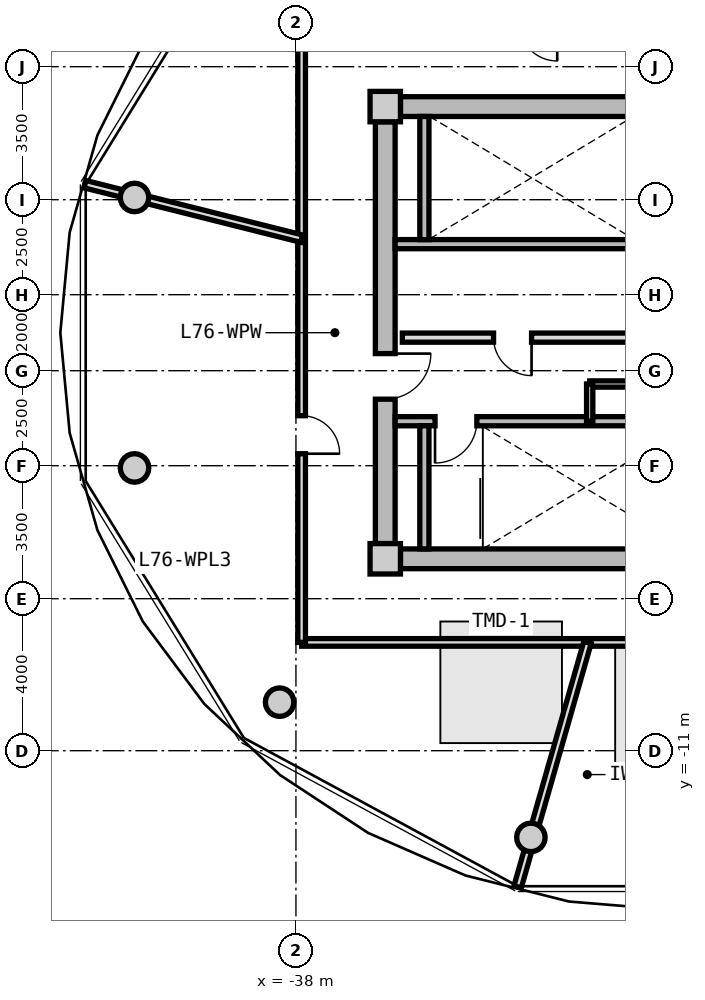
"""IFC4 building model, lengths in metres.
Left out: names, types, materials, properties, quantities, classifications, styles, units other than length and angle.
Written with IfcOpenShell. Run it as: python <this file> out.ifc"""

import sys

from ifc_helpers import new_model, si_unit, direction, frame, frame_2d, origin, origin_2d, place, context, subcontext, project, spatial, rectangle, circle, extrude, source, transform, mapped, element, fill, save


model = new_model("IFC4")
c1 = context("Model", 3, precision=1e-05, world=origin(), true_north=direction((0.0, 1.0)))
c2 = subcontext(c1, "Body", "Model", "MODEL_VIEW")
j1 = project(units=[si_unit("LENGTHUNIT", "METRE"), si_unit("PLANEANGLEUNIT", "RADIAN")], contexts=[c1])
p1 = place(None, origin())
s1 = spatial("IfcSite", under=j1, at=p1, CompositionType="ELEMENT")
p2 = place(p1, origin())
s2 = spatial("IfcBuilding", under=s1, at=p2, CompositionType="ELEMENT")
p3 = place(p2, frame((0.0, 0.0, 244.4)))
s3 = spatial("IfcBuildingStorey", under=s2, at=p3, CompositionType="ELEMENT", Elevation=244.4)
m1 = source(origin(), c2, "Body", "SweptSolid", [
    extrude(rectangle(XDim=0.8, YDim=0.8, at=origin_2d()), origin(), (0.0, 0.0, 1.0), 5.45),
])
for number, where, z_axis, x_axis in (
    (1, (-35.65, -5.95, 0.0), (0.0, 0.0, 1.0), (1.0, 0.0, 0.0)),
    (2, (-35.65, 5.95, 0.0), (0.0, 0.0, 1.0), (1.0, 0.0, 0.0)),
):
    element("IfcColumn", number, at=place(p3, frame(where, z_axis=z_axis, x_axis=x_axis)), inside=s3, PredefinedType="COLUMN", context=c2, shape_type="MappedRepresentation", body=[
        mapped(m1, transform((0.0, 0.0, 0.0), x_axis=(1.0, 0.0, 0.0), y_axis=(0.0, 1.0, 0.0), z_axis=(0.0, 0.0, 1.0), scale=1.0)),
    ])
m2 = source(origin(), c2, "Body", "SweptSolid", [
    extrude(rectangle(XDim=14.5, YDim=0.52, at=frame_2d((7.25, 0.0))), origin(), (0.0, 0.0, 1.0), 5.175),
])
for number, where, z_axis, x_axis in (
    (3, (-35.25, 5.95, 0.0), (0.0, 0.0, 1.0), (1.0, 0.0, 0.0)),
    (4, (-20.75, -5.95, 0.0), (0.0, 0.0, 1.0), (-1.0, 0.0, 0.0)),
):
    element("IfcWall", number, at=place(p3, frame(where, z_axis=z_axis, x_axis=x_axis)), inside=s3, PredefinedType="SHEAR", context=c2, shape_type="MappedRepresentation", body=[
        mapped(m2, transform((0.0, 0.0, 0.0), x_axis=(1.0, 0.0, 0.0), y_axis=(0.0, 1.0, 0.0), z_axis=(0.0, 0.0, 1.0), scale=1.0)),
    ])
m3 = source(origin(), c2, "Body", "SweptSolid", [
    extrude(rectangle(XDim=11.1, YDim=0.52, at=frame_2d((5.55, 0.0))), origin(), (0.0, 0.0, 1.0), 5.175),
])
p4 = place(p3, frame((-35.65, -5.55, 0.0), z_axis=(0.0, 0.0, 1.0), x_axis=(0.0, 1.0, 0.0)))
e5 = element("IfcWall", 5, at=p4, inside=s3, PredefinedType="SHEAR", context=c2, shape_type="MappedRepresentation", body=[
    mapped(m3, transform((0.0, 0.0, 0.0), x_axis=(1.0, 0.0, 0.0), y_axis=(0.0, 1.0, 0.0), z_axis=(0.0, 0.0, 1.0), scale=1.0)),
])
p5 = place(p4, frame((3.8, 0.0, 0.0)))
e6 = element("IfcOpeningElement", 6, at=p5, cuts=e5, PredefinedType="OPENING", context=c2, shape_type="SweptSolid", body=[
    extrude(rectangle(XDim=1.2, YDim=2.15, at=frame_2d((0.6, 1.075))), frame((0.0, 0.27, 0.0), z_axis=(0.0, -1.0, 0.0), x_axis=(1.0, 0.0, 0.0)), (0.0, 0.0, 1.0), 0.54),
])
m4 = source(origin(), c2, "Body", "SweptSolid", [
    extrude(circle(Radius=0.375, at=origin_2d()), origin(), (0.0, 0.0, 1.0), 5.45),
])
for number, where, z_axis, x_axis in (
    (7, (-42.247, 3.559, 0.0), (0.0, 0.0, 1.0), (1.0, 0.0, 0.0)),
    (8, (-42.247, -3.559, 0.0), (0.0, 0.0, 1.0), (1.0, 0.0, 0.0)),
    (9, (-38.43, -9.723, 0.0), (0.0, 0.0, 1.0), (1.0, 0.0, 0.0)),
    (10, (-31.818, -13.281, 0.0), (0.0, 0.0, 1.0), (1.0, 0.0, 0.0)),
):
    element("IfcColumn", number, at=place(p3, frame(where, z_axis=z_axis, x_axis=x_axis)), inside=s3, PredefinedType="COLUMN", context=c2, shape_type="MappedRepresentation", body=[
        mapped(m4, transform((0.0, 0.0, 0.0), x_axis=(1.0, 0.0, 0.0), y_axis=(0.0, 1.0, 0.0), z_axis=(0.0, 0.0, 1.0), scale=1.0)),
    ])
m5 = source(origin(), c2, "Body", "SweptSolid", [
    extrude(rectangle(XDim=7.93, YDim=0.24, at=frame_2d((3.965, 0.0))), origin(), (0.0, 0.0, 1.0), 5.175),
])
p6 = place(p3, frame((-35.39, 2.33, 0.0), z_axis=(0.0, 0.0, 1.0), x_axis=(1.0, 0.0, 0.0)))
e11 = element("IfcWall", 11, at=p6, inside=s3, PredefinedType="PARTITIONING", context=c2, shape_type="MappedRepresentation", body=[
    mapped(m5, transform((0.0, 0.0, 0.0), x_axis=(1.0, 0.0, 0.0), y_axis=(0.0, 1.0, 0.0), z_axis=(0.0, 0.0, 1.0), scale=1.0)),
])
m6 = source(origin(), c2, "Body", "SweptSolid", [
    extrude(rectangle(XDim=3.24, YDim=0.24, at=frame_2d((1.62, 0.0))), origin(), (0.0, 0.0, 1.0), 5.175),
])
p7 = place(p3, frame((-34.62, 2.45, 0.0), z_axis=(0.0, 0.0, 1.0), x_axis=(0.0, 1.0, 0.0)))
e12 = element("IfcWall", 12, at=p7, inside=s3, PredefinedType="PARTITIONING", context=c2, shape_type="MappedRepresentation", body=[
    mapped(m6, transform((0.0, 0.0, 0.0), x_axis=(1.0, 0.0, 0.0), y_axis=(0.0, 1.0, 0.0), z_axis=(0.0, 0.0, 1.0), scale=1.0)),
])
p8 = place(p3, frame((-35.39, -2.33, 0.0), z_axis=(0.0, 0.0, 1.0), x_axis=(1.0, 0.0, 0.0)))
e13 = element("IfcWall", 13, at=p8, inside=s3, PredefinedType="PARTITIONING", context=c2, shape_type="MappedRepresentation", body=[
    mapped(m5, transform((0.0, 0.0, 0.0), x_axis=(1.0, 0.0, 0.0), y_axis=(0.0, 1.0, 0.0), z_axis=(0.0, 0.0, 1.0), scale=1.0)),
])
p9 = place(p8, frame((1.05, 0.0, 0.0)))
e14 = element("IfcOpeningElement", 14, at=p9, cuts=e13, PredefinedType="OPENING", context=c2, shape_type="SweptSolid", body=[
    extrude(rectangle(XDim=1.1, YDim=2.15, at=frame_2d((0.55, 1.075))), frame((0.0, 0.13, 0.0), z_axis=(0.0, -1.0, 0.0), x_axis=(1.0, 0.0, 0.0)), (0.0, 0.0, 1.0), 0.26),
])
p10 = place(p3, frame((-34.62, -5.69, 0.0), z_axis=(0.0, 0.0, 1.0), x_axis=(0.0, 1.0, 0.0)))
e15 = element("IfcWall", 15, at=p10, inside=s3, PredefinedType="PARTITIONING", context=c2, shape_type="MappedRepresentation", body=[
    mapped(m6, transform((0.0, 0.0, 0.0), x_axis=(1.0, 0.0, 0.0), y_axis=(0.0, 1.0, 0.0), z_axis=(0.0, 0.0, 1.0), scale=1.0)),
])
m7 = source(origin(), c2, "Body", "SweptSolid", [
    extrude(rectangle(XDim=7.62, YDim=0.24, at=frame_2d((3.81, 0.0))), origin(), (0.0, 0.0, 1.0), 5.16),
])
p11 = place(p3, frame((-35.2, -0.13, 0.0), z_axis=(0.0, 0.0, 1.0), x_axis=(1.0, 0.0, 0.0)))
e16 = element("IfcWall", 16, at=p11, inside=s3, PredefinedType="PARTITIONING", context=c2, shape_type="MappedRepresentation", body=[
    mapped(m7, transform((0.0, 0.0, 0.0), x_axis=(1.0, 0.0, 0.0), y_axis=(0.0, 1.0, 0.0), z_axis=(0.0, 0.0, 1.0), scale=1.0)),
])
p12 = place(p11, frame((6.22, 0.0, 0.0)))
e17 = element("IfcOpeningElement", 17, at=p12, cuts=e16, PredefinedType="OPENING", context=c2, shape_type="SweptSolid", body=[
    extrude(rectangle(XDim=1.0, YDim=2.1, at=frame_2d((0.5, 1.05))), frame((0.0, 0.13, 0.0), z_axis=(0.0, -1.0, 0.0), x_axis=(1.0, 0.0, 0.0)), (0.0, 0.0, 1.0), 0.26),
])
p13 = place(p11, frame((2.4, 0.0, 0.0)))
e18 = element("IfcOpeningElement", 18, at=p13, cuts=e16, PredefinedType="OPENING", context=c2, shape_type="SweptSolid", body=[
    extrude(rectangle(XDim=1.0, YDim=2.1, at=frame_2d((0.5, 1.05))), frame((0.0, 0.13, 0.0), z_axis=(0.0, -1.0, 0.0), x_axis=(1.0, 0.0, 0.0)), (0.0, 0.0, 1.0), 0.26),
])
m8 = source(origin(), c2, "Body", "SweptSolid", [
    extrude(rectangle(XDim=4.77, YDim=0.165, at=frame_2d((2.385, 0.0))), origin(), (0.0, 0.0, 1.0), 5.16),
])
p14 = place(p3, frame((-30.27, -1.35, 0.0), z_axis=(0.0, 0.0, 1.0), x_axis=(1.0, 0.0, 0.0)))
e19 = element("IfcWall", 19, at=p14, inside=s3, PredefinedType="PARTITIONING", context=c2, shape_type="MappedRepresentation", body=[
    mapped(m8, transform((0.0, 0.0, 0.0), x_axis=(1.0, 0.0, 0.0), y_axis=(0.0, 1.0, 0.0), z_axis=(0.0, 0.0, 1.0), scale=1.0)),
])
p15 = place(p14, frame((1.85, 0.0, 0.0)))
e20 = element("IfcOpeningElement", 20, at=p15, cuts=e19, PredefinedType="OPENING", context=c2, shape_type="SweptSolid", body=[
    extrude(rectangle(XDim=1.0, YDim=2.1, at=frame_2d((0.5, 1.05))), frame((0.0, 0.093, 0.0), z_axis=(0.0, -1.0, 0.0), x_axis=(1.0, 0.0, 0.0)), (0.0, 0.0, 1.0), 0.185),
])
m9 = source(origin(), c2, "Body", "SweptSolid", [
    extrude(rectangle(XDim=0.98, YDim=0.165, at=frame_2d((0.49, 0.0))), origin(), (0.0, 0.0, 1.0), 5.16),
])
p16 = place(p3, frame((-30.27, -2.33, 0.0), z_axis=(0.0, 0.0, 1.0), x_axis=(0.0, 1.0, 0.0)))
e21 = element("IfcWall", 21, at=p16, inside=s3, PredefinedType="PARTITIONING", context=c2, shape_type="MappedRepresentation", body=[
    mapped(m9, transform((0.0, 0.0, 0.0), x_axis=(1.0, 0.0, 0.0), y_axis=(0.0, 1.0, 0.0), z_axis=(0.0, 0.0, 1.0), scale=1.0)),
])
m10 = source(origin(), c2, "Body", "SweptSolid", [
    extrude(rectangle(XDim=19.7, YDim=0.2, at=frame_2d((9.85, 0.0))), origin(), (0.0, 0.0, 1.0), 5.16),
])
p17 = place(p3, frame((-18.15, -8.15, 0.0), z_axis=(0.0, 0.0, 1.0), x_axis=(-1.0, 0.0, 0.0)))
e22 = element("IfcWall", 22, at=p17, inside=s3, PredefinedType="PARTITIONING", context=c2, shape_type="MappedRepresentation", body=[
    mapped(m10, transform((0.0, 0.0, 0.0), x_axis=(1.0, 0.0, 0.0), y_axis=(0.0, 1.0, 0.0), z_axis=(0.0, 0.0, 1.0), scale=1.0)),
])
p18 = place(p17, frame((5.725, 0.0, 0.0)))
e23 = element("IfcOpeningElement", 23, at=p18, cuts=e22, PredefinedType="OPENING", context=c2, shape_type="SweptSolid", body=[
    extrude(rectangle(XDim=1.0, YDim=2.1, at=frame_2d((0.5, 1.05))), frame((0.0, 0.11, 0.0), z_axis=(0.0, -1.0, 0.0), x_axis=(1.0, 0.0, 0.0)), (0.0, 0.0, 1.0), 0.22),
])
m11 = source(origin(), c2, "Body", "SweptSolid", [
    extrude(rectangle(XDim=16.3, YDim=0.2, at=frame_2d((8.15, 0.0))), origin(), (0.0, 0.0, 1.0), 5.16),
])
p19 = place(p3, frame((-37.85, -8.15, 0.0), z_axis=(0.0, 0.0, 1.0), x_axis=(0.0, 1.0, 0.0)))
e24 = element("IfcWall", 24, at=p19, inside=s3, PredefinedType="PARTITIONING", context=c2, shape_type="MappedRepresentation", body=[
    mapped(m11, transform((0.0, 0.0, 0.0), x_axis=(1.0, 0.0, 0.0), y_axis=(0.0, 1.0, 0.0), z_axis=(0.0, 0.0, 1.0), scale=1.0)),
])
p20 = place(p19, frame((4.966, 0.0, 0.0)))
e25 = element("IfcOpeningElement", 25, at=p20, cuts=e24, PredefinedType="OPENING", context=c2, shape_type="SweptSolid", body=[
    extrude(rectangle(XDim=1.0, YDim=2.1, at=frame_2d((0.5, 1.05))), frame((0.0, 0.11, 0.0), z_axis=(0.0, -1.0, 0.0), x_axis=(1.0, 0.0, 0.0)), (0.0, 0.0, 1.0), 0.22),
])
m12 = source(origin(), c2, "Body", "SweptSolid", [
    extrude(rectangle(XDim=6.693, YDim=0.2, at=frame_2d((3.347, 0.0))), origin(), (0.0, 0.0, 1.0), 4.76),
])
p21 = place(p3, frame((-30.328, -8.15, 0.0), z_axis=(0.0, 0.0, 1.0), x_axis=(-0.2747066748, -0.96152807698, 0.0)))
e26 = element("IfcWall", 26, at=p21, inside=s3, PredefinedType="PARTITIONING", context=c2, shape_type="MappedRepresentation", body=[
    mapped(m12, transform((0.0, 0.0, 0.0), x_axis=(1.0, 0.0, 0.0), y_axis=(0.0, 1.0, 0.0), z_axis=(0.0, 0.0, 1.0), scale=1.0)),
])
m13 = source(origin(), c2, "Body", "SweptSolid", [
    extrude(rectangle(XDim=5.879, YDim=0.2, at=frame_2d((2.939, 0.0))), origin(), (0.0, 0.0, 1.0), 4.76),
])
p22 = place(p3, frame((-37.85, 2.475, 0.0), z_axis=(0.0, 0.0, 1.0), x_axis=(-0.96984127658, 0.24373735504, 0.0)))
e27 = element("IfcWall", 27, at=p22, inside=s3, PredefinedType="PARTITIONING", context=c2, shape_type="MappedRepresentation", body=[
    mapped(m13, transform((0.0, 0.0, 0.0), x_axis=(1.0, 0.0, 0.0), y_axis=(0.0, 1.0, 0.0), z_axis=(0.0, 0.0, 1.0), scale=1.0)),
])
m14 = source(origin(), c2, "Body", "SweptSolid", [
    extrude(rectangle(XDim=1.1, YDim=2.15, at=frame_2d((0.55, 1.075))), frame((0.0, 0.025, 0.0), z_axis=(0.0, -1.0, 0.0), x_axis=(1.0, 0.0, 0.0)), (0.0, 0.0, 1.0), 0.05),
])
p23 = place(p9, frame((1.1, 0.0, 0.0), z_axis=(0.0, 0.0, 1.0), x_axis=(-1.0, 0.0, 0.0)))
e28 = element("IfcDoor", 28, at=p23, inside=s3, OperationType="SINGLE_SWING_RIGHT", PredefinedType="DOOR", context=c2, shape_type="MappedRepresentation", body=[
    mapped(m14, transform((0.0, 0.0, 0.0), x_axis=(1.0, 0.0, 0.0), y_axis=(0.0, 1.0, 0.0), z_axis=(0.0, 0.0, 1.0), scale=1.0)),
])
fill(e14, e28)
m15 = source(origin(), c2, "Body", "SweptSolid", [
    extrude(rectangle(XDim=1.2, YDim=2.15, at=frame_2d((0.6, 1.075))), frame((0.0, 0.025, 0.0), z_axis=(0.0, -1.0, 0.0), x_axis=(1.0, 0.0, 0.0)), (0.0, 0.0, 1.0), 0.05),
])
p24 = place(p5, frame((1.2, 0.0, 0.0), z_axis=(0.0, 0.0, 1.0), x_axis=(-1.0, 0.0, 0.0)))
e29 = element("IfcDoor", 29, at=p24, inside=s3, OperationType="SINGLE_SWING_LEFT", PredefinedType="DOOR", context=c2, shape_type="MappedRepresentation", body=[
    mapped(m15, transform((0.0, 0.0, 0.0), x_axis=(1.0, 0.0, 0.0), y_axis=(0.0, 1.0, 0.0), z_axis=(0.0, 0.0, 1.0), scale=1.0)),
])
fill(e6, e29)
m16 = source(origin(), c2, "Body", "SweptSolid", [
    extrude(rectangle(XDim=1.0, YDim=2.1, at=frame_2d((0.5, 1.05))), frame((0.0, 0.025, 0.0), z_axis=(0.0, -1.0, 0.0), x_axis=(1.0, 0.0, 0.0)), (0.0, 0.0, 1.0), 0.05),
])
p25 = place(p13, frame((1.0, 0.0, 0.0), z_axis=(0.0, 0.0, 1.0), x_axis=(-1.0, 0.0, 0.0)))
e30 = element("IfcDoor", 30, at=p25, inside=s3, OperationType="SINGLE_SWING_LEFT", PredefinedType="DOOR", context=c2, shape_type="MappedRepresentation", body=[
    mapped(m16, transform((0.0, 0.0, 0.0), x_axis=(1.0, 0.0, 0.0), y_axis=(0.0, 1.0, 0.0), z_axis=(0.0, 0.0, 1.0), scale=1.0)),
])
fill(e18, e30)
p26 = place(p20, frame((1.0, 0.0, 0.0), z_axis=(0.0, 0.0, 1.0), x_axis=(-1.0, 0.0, 0.0)))
e31 = element("IfcDoor", 31, at=p26, inside=s3, OperationType="SINGLE_SWING_RIGHT", PredefinedType="DOOR", context=c2, shape_type="MappedRepresentation", body=[
    mapped(m16, transform((0.0, 0.0, 0.0), x_axis=(1.0, 0.0, 0.0), y_axis=(0.0, 1.0, 0.0), z_axis=(0.0, 0.0, 1.0), scale=1.0)),
])
fill(e25, e31)
save(model, sys.argv[1])
